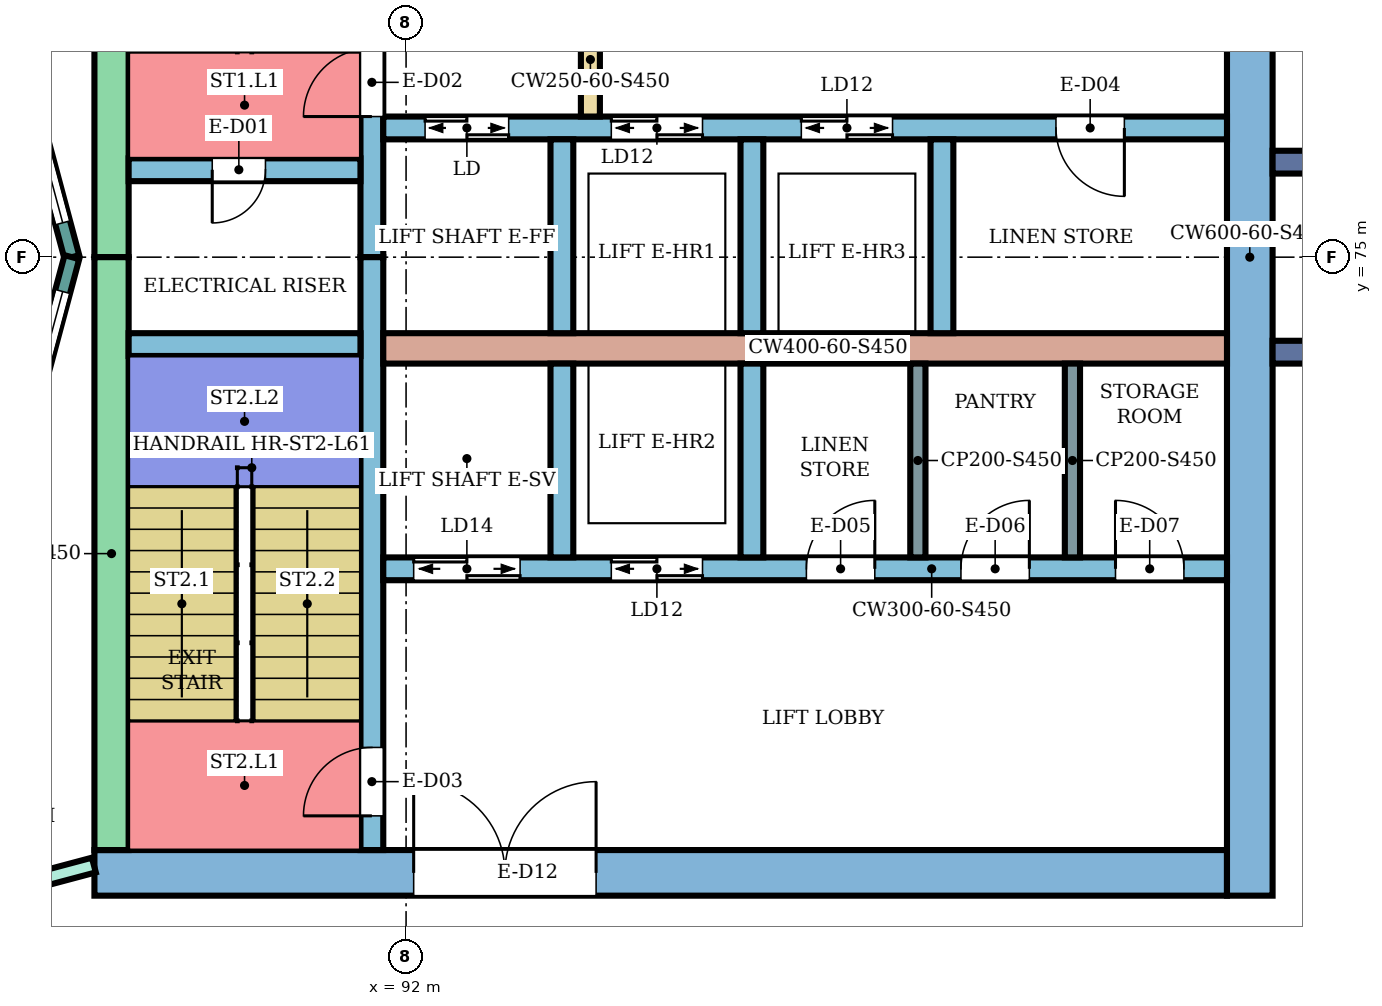
"""IFC4 building model, lengths in metres.
Left out: names, types, materials, properties, quantities, classifications, styles, units other than length and angle.
Written with IfcOpenShell. Run it as: python <this file> out.ifc"""

import sys

from ifc_helpers import new_model, si_unit, direction, frame, frame_2d, origin, place, context, subcontext, project, spatial, rectangle, extrude, element, fill, save


model = new_model("IFC4")
c1 = context("Model", 3, precision=1e-05, world=origin(), true_north=direction((0.0, 1.0)))
c2 = subcontext(c1, "Body", "Model", "MODEL_VIEW")
j1 = project(units=[si_unit("LENGTHUNIT", "METRE"), si_unit("PLANEANGLEUNIT", "RADIAN")], contexts=[c1])
p1 = place(None, origin())
s1 = spatial("IfcSite", under=j1, at=p1, CompositionType="ELEMENT")
p2 = place(p1, origin())
s2 = spatial("IfcBuilding", under=s1, at=p2, CompositionType="ELEMENT")
p3 = place(p2, frame((0.0, 0.0, 266.7)))
s3 = spatial("IfcBuildingStorey", under=s2, at=p3, CompositionType="ELEMENT", Elevation=266.7)
p4 = place(p3, frame((87.9, 66.9, 0.0), z_axis=(0.0, 0.0, 1.0), x_axis=(1.0, 0.0, 0.0)))
e1 = element("IfcWall", 1, at=p4, inside=s3, PredefinedType="SHEAR", context=c2, shape_type="SweptSolid", body=[
    extrude(rectangle(XDim=14.9, YDim=0.6, at=frame_2d((7.45, 0.0))), origin(), (0.0, 0.0, 1.0), 3.75),
])
p5 = place(p4, frame((4.2, 0.0, 0.0)))
e2 = element("IfcOpeningElement", 2, at=p5, cuts=e1, PredefinedType="OPENING", context=c2, shape_type="SweptSolid", body=[
    extrude(rectangle(XDim=2.4, YDim=2.4, at=frame_2d((1.2, 1.2))), frame((0.0, 0.31, 0.0), z_axis=(0.0, -1.0, 0.0), x_axis=(1.0, 0.0, 0.0)), (0.0, 0.0, 1.0), 0.62),
])
for number, where, z_axis, x_axis in (
    (3, (88.125, 75.0, 0.0), (0.0, 0.0, 1.0), (0.0, 1.0, 0.0)),
    (4, (88.125, 67.2, 0.0), (0.0, 0.0, 1.0), (0.0, 1.0, 0.0)),
):
    element("IfcWall", number, at=place(p3, frame(where, z_axis=z_axis, x_axis=x_axis)), inside=s3, PredefinedType="SHEAR", context=c2, shape_type="SweptSolid", body=[
        extrude(rectangle(XDim=7.8, YDim=0.45, at=frame_2d((3.9, 0.0))), origin(), (0.0, 0.0, 1.0), 3.75),
    ])
p6 = place(p3, frame((103.1, 66.6, 0.0), z_axis=(0.0, 0.0, 1.0), x_axis=(0.0, 1.0, 0.0)))
e5 = element("IfcWall", 5, at=p6, inside=s3, PredefinedType="SHEAR", context=c2, shape_type="SweptSolid", body=[
    extrude(rectangle(XDim=16.8, YDim=0.6, at=frame_2d((8.4, 0.0))), origin(), (0.0, 0.0, 1.0), 3.75),
])
p7 = place(p3, frame((91.55, 75.0, 0.0), z_axis=(0.0, 0.0, 1.0), x_axis=(0.0, 1.0, 0.0)))
e6 = element("IfcWall", 6, at=p7, inside=s3, PredefinedType="SHEAR", context=c2, shape_type="SweptSolid", body=[
    extrude(rectangle(XDim=7.8, YDim=0.3, at=frame_2d((3.9, 0.0))), origin(), (0.0, 0.0, 1.0), 3.75),
])
p8 = place(p7, frame((1.85, 0.0, 0.0)))
e7 = element("IfcOpeningElement", 7, at=p8, cuts=e6, PredefinedType="OPENING", context=c2, shape_type="SweptSolid", body=[
    extrude(rectangle(XDim=0.9, YDim=2.1, at=frame_2d((0.45, 1.05))), frame((0.0, 0.16, 0.0), z_axis=(0.0, -1.0, 0.0), x_axis=(1.0, 0.0, 0.0)), (0.0, 0.0, 1.0), 0.32),
])
p9 = place(p3, frame((91.55, 67.2, 0.0), z_axis=(0.0, 0.0, 1.0), x_axis=(0.0, 1.0, 0.0)))
e8 = element("IfcWall", 8, at=p9, inside=s3, PredefinedType="SHEAR", context=c2, shape_type="SweptSolid", body=[
    extrude(rectangle(XDim=7.8, YDim=0.3, at=frame_2d((3.9, 0.0))), origin(), (0.0, 0.0, 1.0), 3.75),
])
p10 = place(p9, frame((0.45, 0.0, 0.0)))
e9 = element("IfcOpeningElement", 9, at=p10, cuts=e8, PredefinedType="OPENING", context=c2, shape_type="SweptSolid", body=[
    extrude(rectangle(XDim=0.9, YDim=2.1, at=frame_2d((0.45, 1.05))), frame((0.0, 0.16, 0.0), z_axis=(0.0, -1.0, 0.0), x_axis=(1.0, 0.0, 0.0)), (0.0, 0.0, 1.0), 0.32),
])
p11 = place(p3, frame((88.35, 76.15, 0.0), z_axis=(0.0, 0.0, 1.0), x_axis=(1.0, 0.0, 0.0)))
e10 = element("IfcWall", 10, at=p11, inside=s3, PredefinedType="SHEAR", context=c2, shape_type="SweptSolid", body=[
    extrude(rectangle(XDim=3.05, YDim=0.3, at=frame_2d((1.525, 0.0))), origin(), (0.0, 0.0, 1.0), 3.75),
])
p12 = place(p11, frame((1.1, 0.0, 0.0)))
e11 = element("IfcOpeningElement", 11, at=p12, cuts=e10, PredefinedType="OPENING", context=c2, shape_type="SweptSolid", body=[
    extrude(rectangle(XDim=0.7, YDim=2.0, at=frame_2d((0.35, 1.0))), frame((0.0, 0.16, 0.0), z_axis=(0.0, -1.0, 0.0), x_axis=(1.0, 0.0, 0.0)), (0.0, 0.0, 1.0), 0.32),
])
p13 = place(p3, frame((88.35, 73.85, 0.0), z_axis=(0.0, 0.0, 1.0), x_axis=(1.0, 0.0, 0.0)))
e12 = element("IfcWall", 12, at=p13, inside=s3, PredefinedType="SHEAR", context=c2, shape_type="SweptSolid", body=[
    extrude(rectangle(XDim=3.05, YDim=0.3, at=frame_2d((1.525, 0.0))), origin(), (0.0, 0.0, 1.0), 3.75),
])
p14 = place(p3, frame((91.7, 76.7, 0.0), z_axis=(0.0, 0.0, 1.0), x_axis=(1.0, 0.0, 0.0)))
e13 = element("IfcWall", 13, at=p14, inside=s3, PredefinedType="SHEAR", context=c2, shape_type="SweptSolid", body=[
    extrude(rectangle(XDim=11.1, YDim=0.3, at=frame_2d((5.55, 0.0))), origin(), (0.0, 0.0, 1.0), 3.75),
])
p15 = place(p14, frame((0.55, 0.0, 0.0)))
e14 = element("IfcOpeningElement", 14, at=p15, cuts=e13, PredefinedType="OPENING", context=c2, shape_type="SweptSolid", body=[
    extrude(rectangle(XDim=1.1, YDim=2.1, at=frame_2d((0.55, 1.05))), frame((0.0, 0.16, 0.0), z_axis=(0.0, -1.0, 0.0), x_axis=(1.0, 0.0, 0.0)), (0.0, 0.0, 1.0), 0.32),
])
p16 = place(p14, frame((3.0, 0.0, 0.0)))
e15 = element("IfcOpeningElement", 15, at=p16, cuts=e13, PredefinedType="OPENING", context=c2, shape_type="SweptSolid", body=[
    extrude(rectangle(XDim=1.2, YDim=2.1, at=frame_2d((0.6, 1.05))), frame((0.0, 0.16, 0.0), z_axis=(0.0, -1.0, 0.0), x_axis=(1.0, 0.0, 0.0)), (0.0, 0.0, 1.0), 0.32),
])
p17 = place(p14, frame((5.5, 0.0, 0.0)))
e16 = element("IfcOpeningElement", 16, at=p17, cuts=e13, PredefinedType="OPENING", context=c2, shape_type="SweptSolid", body=[
    extrude(rectangle(XDim=1.2, YDim=2.1, at=frame_2d((0.6, 1.05))), frame((0.0, 0.16, 0.0), z_axis=(0.0, -1.0, 0.0), x_axis=(1.0, 0.0, 0.0)), (0.0, 0.0, 1.0), 0.32),
])
p18 = place(p14, frame((8.85, 0.0, 0.0)))
e17 = element("IfcOpeningElement", 17, at=p18, cuts=e13, PredefinedType="OPENING", context=c2, shape_type="SweptSolid", body=[
    extrude(rectangle(XDim=0.9, YDim=2.1, at=frame_2d((0.45, 1.05))), frame((0.0, 0.16, 0.0), z_axis=(0.0, -1.0, 0.0), x_axis=(1.0, 0.0, 0.0)), (0.0, 0.0, 1.0), 0.32),
])
p19 = place(p3, frame((91.7, 73.8, 0.0), z_axis=(0.0, 0.0, 1.0), x_axis=(1.0, 0.0, 0.0)))
e18 = element("IfcWall", 18, at=p19, inside=s3, PredefinedType="SHEAR", context=c2, shape_type="SweptSolid", body=[
    extrude(rectangle(XDim=11.1, YDim=0.4, at=frame_2d((5.55, 0.0))), origin(), (0.0, 0.0, 1.0), 3.75),
])
p20 = place(p3, frame((91.7, 70.9, 0.0), z_axis=(0.0, 0.0, 1.0), x_axis=(1.0, 0.0, 0.0)))
e19 = element("IfcWall", 19, at=p20, inside=s3, PredefinedType="SHEAR", context=c2, shape_type="SweptSolid", body=[
    extrude(rectangle(XDim=11.1, YDim=0.3, at=frame_2d((5.55, 0.0))), origin(), (0.0, 0.0, 1.0), 3.75),
])
p21 = place(p20, frame((0.4, 0.0, 0.0)))
e20 = element("IfcOpeningElement", 20, at=p21, cuts=e19, PredefinedType="OPENING", context=c2, shape_type="SweptSolid", body=[
    extrude(rectangle(XDim=1.4, YDim=2.1, at=frame_2d((0.7, 1.05))), frame((0.0, 0.16, 0.0), z_axis=(0.0, -1.0, 0.0), x_axis=(1.0, 0.0, 0.0)), (0.0, 0.0, 1.0), 0.32),
])
p22 = place(p20, frame((3.0, 0.0, 0.0)))
e21 = element("IfcOpeningElement", 21, at=p22, cuts=e19, PredefinedType="OPENING", context=c2, shape_type="SweptSolid", body=[
    extrude(rectangle(XDim=1.2, YDim=2.1, at=frame_2d((0.6, 1.05))), frame((0.0, 0.16, 0.0), z_axis=(0.0, -1.0, 0.0), x_axis=(1.0, 0.0, 0.0)), (0.0, 0.0, 1.0), 0.32),
])
p23 = place(p20, frame((5.567, 0.0, 0.0)))
e22 = element("IfcOpeningElement", 22, at=p23, cuts=e19, PredefinedType="OPENING", context=c2, shape_type="SweptSolid", body=[
    extrude(rectangle(XDim=0.9, YDim=2.1, at=frame_2d((0.45, 1.05))), frame((0.0, 0.16, 0.0), z_axis=(0.0, -1.0, 0.0), x_axis=(1.0, 0.0, 0.0)), (0.0, 0.0, 1.0), 0.32),
])
p24 = place(p20, frame((7.6, 0.0, 0.0)))
e23 = element("IfcOpeningElement", 23, at=p24, cuts=e19, PredefinedType="OPENING", context=c2, shape_type="SweptSolid", body=[
    extrude(rectangle(XDim=0.9, YDim=2.1, at=frame_2d((0.45, 1.05))), frame((0.0, 0.16, 0.0), z_axis=(0.0, -1.0, 0.0), x_axis=(1.0, 0.0, 0.0)), (0.0, 0.0, 1.0), 0.32),
])
p25 = place(p20, frame((9.633, 0.0, 0.0)))
e24 = element("IfcOpeningElement", 24, at=p25, cuts=e19, PredefinedType="OPENING", context=c2, shape_type="SweptSolid", body=[
    extrude(rectangle(XDim=0.9, YDim=2.1, at=frame_2d((0.45, 1.05))), frame((0.0, 0.16, 0.0), z_axis=(0.0, -1.0, 0.0), x_axis=(1.0, 0.0, 0.0)), (0.0, 0.0, 1.0), 0.32),
])
for number, where, z_axis, x_axis in (
    (25, (94.05, 74.0, 0.0), (0.0, 0.0, 1.0), (0.0, 1.0, 0.0)),
    (26, (96.55, 74.0, 0.0), (0.0, 0.0, 1.0), (0.0, 1.0, 0.0)),
    (27, (99.05, 74.0, 0.0), (0.0, 0.0, 1.0), (0.0, 1.0, 0.0)),
    (28, (94.05, 71.05, 0.0), (0.0, 0.0, 1.0), (0.0, 1.0, 0.0)),
    (29, (96.55, 71.05, 0.0), (0.0, 0.0, 1.0), (0.0, 1.0, 0.0)),
):
    element("IfcWall", number, at=place(p3, frame(where, z_axis=z_axis, x_axis=x_axis)), inside=s3, PredefinedType="SHEAR", context=c2, shape_type="SweptSolid", body=[
        extrude(rectangle(XDim=2.55, YDim=0.3, at=frame_2d((1.275, 0.0))), origin(), (0.0, 0.0, 1.0), 3.75),
    ])
p26 = place(p3, frame((94.425, 76.85, 0.0), z_axis=(0.0, 0.0, 1.0), x_axis=(0.0, 1.0, 0.0)))
e30 = element("IfcWall", 30, at=p26, inside=s3, PredefinedType="SHEAR", context=c2, shape_type="SweptSolid", body=[
    extrude(rectangle(XDim=1.5, YDim=0.25, at=frame_2d((0.75, 0.0))), origin(), (0.0, 0.0, 1.0), 3.75),
])
for number, where, z_axis, x_axis in (
    (31, (103.4, 73.75, 0.0), (0.0, 0.0, 1.0), (1.0, 0.0, 0.0)),
    (32, (103.4, 76.25, 0.0), (0.0, 0.0, 1.0), (1.0, 0.0, 0.0)),
):
    element("IfcWall", number, at=place(p3, frame(where, z_axis=z_axis, x_axis=x_axis)), inside=s3, PredefinedType="NOTDEFINED", context=c2, shape_type="SweptSolid", body=[
        extrude(rectangle(XDim=2.416, YDim=0.3, at=frame_2d((1.208, 0.0))), origin(), (0.0, 0.0, 1.0), 4.2),
    ])
p27 = place(p3, frame((87.604, 75.0, 0.0), z_axis=(0.0, 0.0, 1.0), x_axis=(-0.258789828301, 0.965933654434, 0.0)))
e33 = element("IfcWall", 33, at=p27, inside=s3, PredefinedType="NOTDEFINED", context=c2, shape_type="SweptSolid", body=[
    extrude(rectangle(XDim=3.936, YDim=0.2, at=frame_2d((1.968, 0.0))), origin(), (0.0, 0.0, 1.0), 4.2),
])
p28 = place(p27, frame((0.468, 0.0, 0.9)))
e34 = element("IfcOpeningElement", 34, at=p28, cuts=e33, PredefinedType="OPENING", context=c2, shape_type="SweptSolid", body=[
    extrude(rectangle(XDim=3.0, YDim=2.3, at=frame_2d((1.5, 1.15))), frame((0.0, 0.11, 0.0), z_axis=(0.0, -1.0, 0.0), x_axis=(1.0, 0.0, 0.0)), (0.0, 0.0, 1.0), 0.22),
])
p29 = place(p3, frame((86.585, 71.198, 0.0), z_axis=(0.0, 0.0, 1.0), x_axis=(0.258789828301, 0.965933654434, 0.0)))
e35 = element("IfcWall", 35, at=p29, inside=s3, PredefinedType="NOTDEFINED", context=c2, shape_type="SweptSolid", body=[
    extrude(rectangle(XDim=3.936, YDim=0.2, at=frame_2d((1.968, 0.0))), origin(), (0.0, 0.0, 1.0), 4.2),
])
p30 = place(p29, frame((0.468, 0.0, 0.9)))
e36 = element("IfcOpeningElement", 36, at=p30, cuts=e35, PredefinedType="OPENING", context=c2, shape_type="SweptSolid", body=[
    extrude(rectangle(XDim=3.0, YDim=2.3, at=frame_2d((1.5, 1.15))), frame((0.0, 0.11, 0.0), z_axis=(0.0, -1.0, 0.0), x_axis=(1.0, 0.0, 0.0)), (0.0, 0.0, 1.0), 0.22),
])
p31 = place(p3, frame((80.0, 64.898, 0.0), z_axis=(0.0, 0.0, 1.0), x_axis=(0.966236923997, 0.25765520896, 0.0)))
e37 = element("IfcWall", 37, at=p31, inside=s3, PredefinedType="PARTITIONING", context=c2, shape_type="SweptSolid", body=[
    extrude(rectangle(XDim=8.168, YDim=0.2, at=frame_2d((4.084, 0.0))), origin(), (0.0, 0.0, 1.0), 3.75),
])
p32 = place(p31, frame((1.893, 0.0, 0.0)))
e38 = element("IfcOpeningElement", 38, at=p32, cuts=e37, PredefinedType="OPENING", context=c2, shape_type="SweptSolid", body=[
    extrude(rectangle(XDim=1.8, YDim=2.1, at=frame_2d((0.9, 1.05))), frame((0.0, 0.11, 0.0), z_axis=(0.0, -1.0, 0.0), x_axis=(1.0, 0.0, 0.0)), (0.0, 0.0, 1.0), 0.22),
])
for number, where, z_axis, x_axis in (
    (39, (98.733, 71.05, 0.0), (0.0, 0.0, 1.0), (0.0, 1.0, 0.0)),
    (40, (100.767, 71.05, 0.0), (0.0, 0.0, 1.0), (0.0, 1.0, 0.0)),
):
    element("IfcWall", number, at=place(p3, frame(where, z_axis=z_axis, x_axis=x_axis)), inside=s3, PredefinedType="PARTITIONING", context=c2, shape_type="SweptSolid", body=[
        extrude(rectangle(XDim=2.55, YDim=0.2, at=frame_2d((1.275, 0.0))), origin(), (0.0, 0.0, 1.0), 3.75),
    ])
p33 = place(p28, origin())
e41 = element("IfcWindow", 41, at=p33, inside=s3, PartitioningType="SINGLE_PANEL", PredefinedType="WINDOW", context=c2, shape_type="SweptSolid", body=[
    extrude(rectangle(XDim=3.0, YDim=2.3, at=frame_2d((1.5, 1.15))), frame((0.0, 0.03, 0.0), z_axis=(0.0, -1.0, 0.0), x_axis=(1.0, 0.0, 0.0)), (0.0, 0.0, 1.0), 0.06),
])
fill(e34, e41)
p34 = place(p30, origin())
e42 = element("IfcWindow", 42, at=p34, inside=s3, PartitioningType="SINGLE_PANEL", PredefinedType="WINDOW", context=c2, shape_type="SweptSolid", body=[
    extrude(rectangle(XDim=3.0, YDim=2.3, at=frame_2d((1.5, 1.15))), frame((0.0, 0.03, 0.0), z_axis=(0.0, -1.0, 0.0), x_axis=(1.0, 0.0, 0.0)), (0.0, 0.0, 1.0), 0.06),
])
fill(e36, e42)
p35 = place(p12, frame((0.7, 0.0, 0.0), z_axis=(0.0, 0.0, 1.0), x_axis=(-1.0, 0.0, 0.0)))
e43 = element("IfcDoor", 43, at=p35, inside=s3, OperationType="SINGLE_SWING_RIGHT", PredefinedType="DOOR", context=c2, shape_type="SweptSolid", body=[
    extrude(rectangle(XDim=0.7, YDim=2.0, at=frame_2d((0.35, 1.0))), frame((0.0, 0.025, 0.0), z_axis=(0.0, -1.0, 0.0), x_axis=(1.0, 0.0, 0.0)), (0.0, 0.0, 1.0), 0.05),
])
fill(e11, e43)
p36 = place(p8, origin())
e44 = element("IfcDoor", 44, at=p36, inside=s3, OperationType="SINGLE_SWING_LEFT", PredefinedType="DOOR", context=c2, shape_type="SweptSolid", body=[
    extrude(rectangle(XDim=0.9, YDim=2.1, at=frame_2d((0.45, 1.05))), frame((0.0, 0.025, 0.0), z_axis=(0.0, -1.0, 0.0), x_axis=(1.0, 0.0, 0.0)), (0.0, 0.0, 1.0), 0.05),
])
fill(e7, e44)
p37 = place(p10, origin())
e45 = element("IfcDoor", 45, at=p37, inside=s3, OperationType="SINGLE_SWING_LEFT", PredefinedType="DOOR", context=c2, shape_type="SweptSolid", body=[
    extrude(rectangle(XDim=0.9, YDim=2.1, at=frame_2d((0.45, 1.05))), frame((0.0, 0.025, 0.0), z_axis=(0.0, -1.0, 0.0), x_axis=(1.0, 0.0, 0.0)), (0.0, 0.0, 1.0), 0.05),
])
fill(e9, e45)
p38 = place(p15, origin())
e46 = element("IfcDoor", 46, at=p38, inside=s3, OperationType="DOUBLE_DOOR_SLIDING", PredefinedType="DOOR", context=c2, shape_type="SweptSolid", body=[
    extrude(rectangle(XDim=1.1, YDim=2.1, at=frame_2d((0.55, 1.05))), frame((0.0, 0.025, 0.0), z_axis=(0.0, -1.0, 0.0), x_axis=(1.0, 0.0, 0.0)), (0.0, 0.0, 1.0), 0.05),
])
fill(e14, e46)
p39 = place(p16, origin())
e47 = element("IfcDoor", 47, at=p39, inside=s3, OperationType="DOUBLE_DOOR_SLIDING", PredefinedType="DOOR", context=c2, shape_type="SweptSolid", body=[
    extrude(rectangle(XDim=1.2, YDim=2.1, at=frame_2d((0.6, 1.05))), frame((0.0, 0.025, 0.0), z_axis=(0.0, -1.0, 0.0), x_axis=(1.0, 0.0, 0.0)), (0.0, 0.0, 1.0), 0.05),
])
fill(e15, e47)
p40 = place(p17, origin())
e48 = element("IfcDoor", 48, at=p40, inside=s3, OperationType="DOUBLE_DOOR_SLIDING", PredefinedType="DOOR", context=c2, shape_type="SweptSolid", body=[
    extrude(rectangle(XDim=1.2, YDim=2.1, at=frame_2d((0.6, 1.05))), frame((0.0, 0.025, 0.0), z_axis=(0.0, -1.0, 0.0), x_axis=(1.0, 0.0, 0.0)), (0.0, 0.0, 1.0), 0.05),
])
fill(e16, e48)
p41 = place(p18, frame((0.9, 0.0, 0.0), z_axis=(0.0, 0.0, 1.0), x_axis=(-1.0, 0.0, 0.0)))
e49 = element("IfcDoor", 49, at=p41, inside=s3, OperationType="SINGLE_SWING_LEFT", PredefinedType="DOOR", context=c2, shape_type="SweptSolid", body=[
    extrude(rectangle(XDim=0.9, YDim=2.1, at=frame_2d((0.45, 1.05))), frame((0.0, 0.025, 0.0), z_axis=(0.0, -1.0, 0.0), x_axis=(1.0, 0.0, 0.0)), (0.0, 0.0, 1.0), 0.05),
])
fill(e17, e49)
p42 = place(p21, origin())
e50 = element("IfcDoor", 50, at=p42, inside=s3, OperationType="DOUBLE_DOOR_SLIDING", PredefinedType="DOOR", context=c2, shape_type="SweptSolid", body=[
    extrude(rectangle(XDim=1.4, YDim=2.1, at=frame_2d((0.7, 1.05))), frame((0.0, 0.025, 0.0), z_axis=(0.0, -1.0, 0.0), x_axis=(1.0, 0.0, 0.0)), (0.0, 0.0, 1.0), 0.05),
])
fill(e20, e50)
p43 = place(p22, origin())
e51 = element("IfcDoor", 51, at=p43, inside=s3, OperationType="DOUBLE_DOOR_SLIDING", PredefinedType="DOOR", context=c2, shape_type="SweptSolid", body=[
    extrude(rectangle(XDim=1.2, YDim=2.1, at=frame_2d((0.6, 1.05))), frame((0.0, 0.025, 0.0), z_axis=(0.0, -1.0, 0.0), x_axis=(1.0, 0.0, 0.0)), (0.0, 0.0, 1.0), 0.05),
])
fill(e21, e51)
p44 = place(p23, origin())
e52 = element("IfcDoor", 52, at=p44, inside=s3, OperationType="SINGLE_SWING_RIGHT", PredefinedType="DOOR", context=c2, shape_type="SweptSolid", body=[
    extrude(rectangle(XDim=0.9, YDim=2.1, at=frame_2d((0.45, 1.05))), frame((0.0, 0.025, 0.0), z_axis=(0.0, -1.0, 0.0), x_axis=(1.0, 0.0, 0.0)), (0.0, 0.0, 1.0), 0.05),
])
fill(e22, e52)
p45 = place(p24, origin())
e53 = element("IfcDoor", 53, at=p45, inside=s3, OperationType="SINGLE_SWING_RIGHT", PredefinedType="DOOR", context=c2, shape_type="SweptSolid", body=[
    extrude(rectangle(XDim=0.9, YDim=2.1, at=frame_2d((0.45, 1.05))), frame((0.0, 0.025, 0.0), z_axis=(0.0, -1.0, 0.0), x_axis=(1.0, 0.0, 0.0)), (0.0, 0.0, 1.0), 0.05),
])
fill(e23, e53)
p46 = place(p25, origin())
e54 = element("IfcDoor", 54, at=p46, inside=s3, OperationType="SINGLE_SWING_LEFT", PredefinedType="DOOR", context=c2, shape_type="SweptSolid", body=[
    extrude(rectangle(XDim=0.9, YDim=2.1, at=frame_2d((0.45, 1.05))), frame((0.0, 0.025, 0.0), z_axis=(0.0, -1.0, 0.0), x_axis=(1.0, 0.0, 0.0)), (0.0, 0.0, 1.0), 0.05),
])
fill(e24, e54)
p47 = place(p5, origin())
e55 = element("IfcDoor", 55, at=p47, inside=s3, OperationType="DOUBLE_DOOR_SINGLE_SWING", PredefinedType="DOOR", context=c2, shape_type="SweptSolid", body=[
    extrude(rectangle(XDim=2.4, YDim=2.4, at=frame_2d((1.2, 1.2))), frame((0.0, 0.025, 0.0), z_axis=(0.0, -1.0, 0.0), x_axis=(1.0, 0.0, 0.0)), (0.0, 0.0, 1.0), 0.05),
])
fill(e2, e55)
save(model, sys.argv[1])
